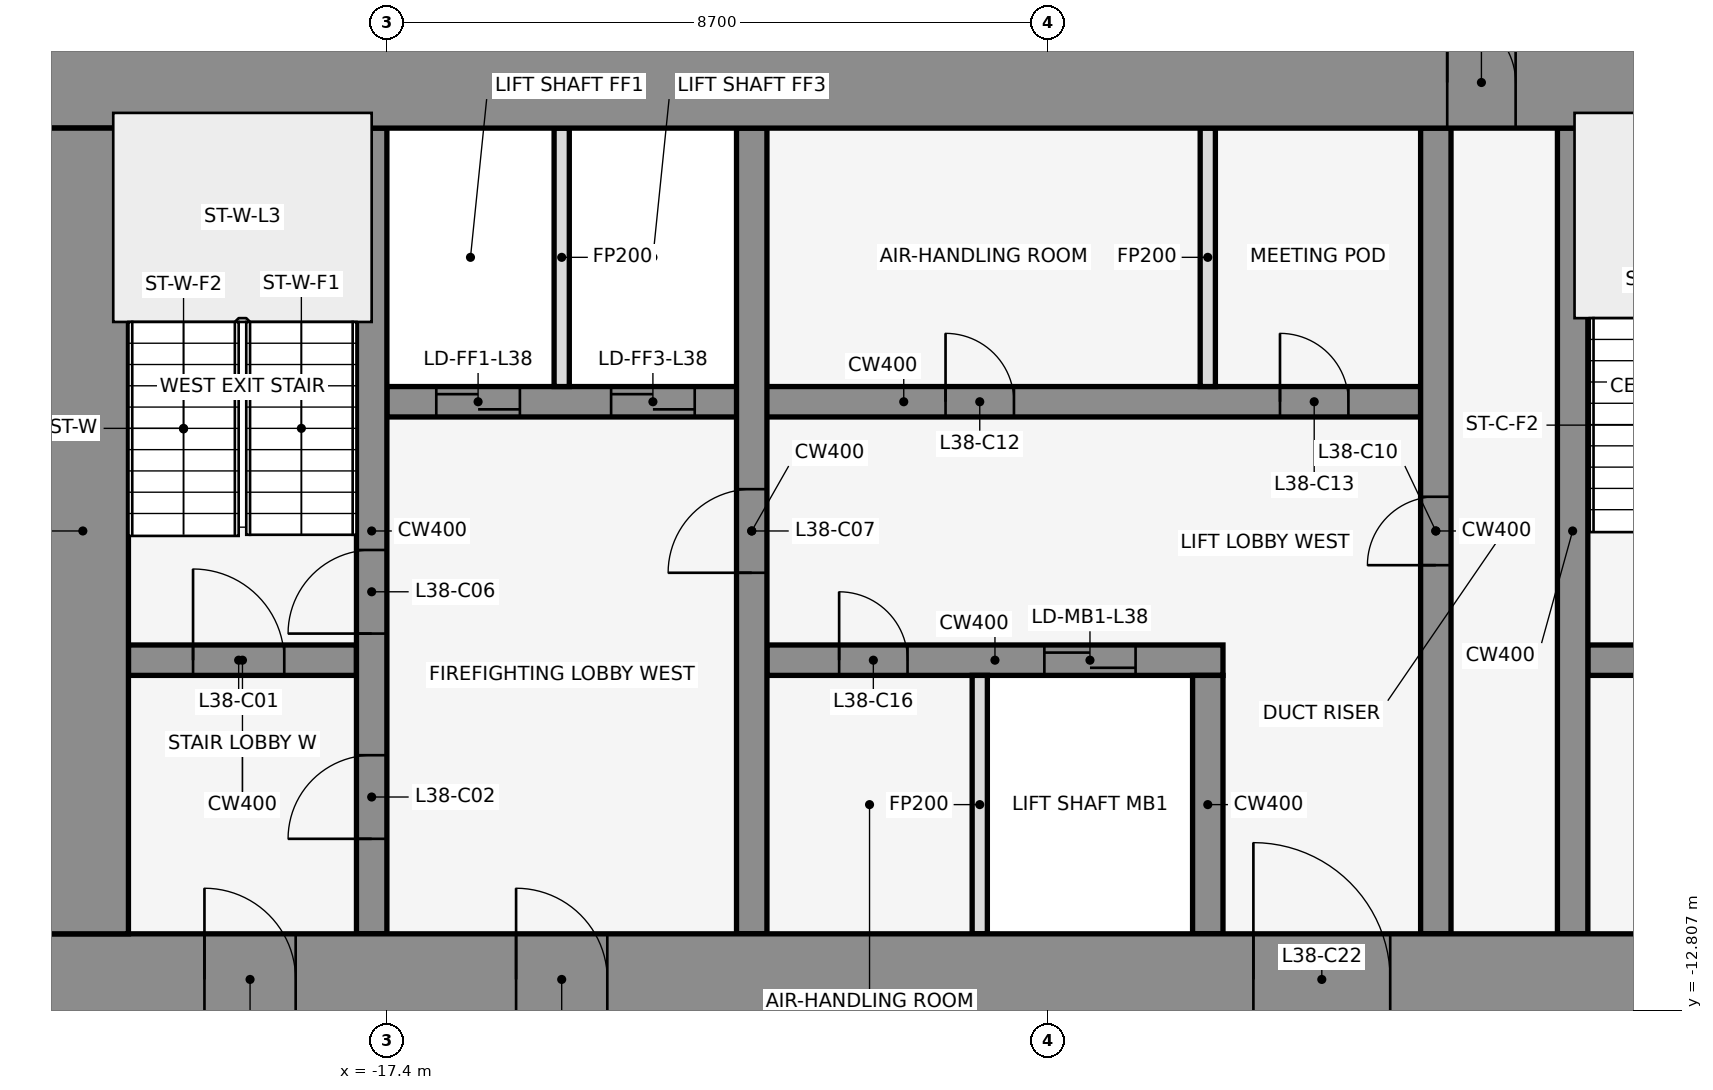
"""IFC4 building model, lengths in metres.
Left out: names, types, materials, properties, quantities, classifications, styles, units other than length and angle.
Written with IfcOpenShell. Run it as: python <this file> out.ifc"""

import sys

from ifc_helpers import new_model, si_unit, direction, frame, frame_2d, origin, place, context, subcontext, project, spatial, rectangle, extrude, element, fill, save


model = new_model("IFC4")
c1 = context("Model", 3, precision=1e-05, world=origin(), true_north=direction((0.0, 1.0)))
c2 = subcontext(c1, "Body", "Model", "MODEL_VIEW")
j1 = project(units=[si_unit("LENGTHUNIT", "METRE"), si_unit("PLANEANGLEUNIT", "RADIAN")], contexts=[c1])
p1 = place(None, origin())
s1 = spatial("IfcSite", under=j1, at=p1, CompositionType="ELEMENT")
p2 = place(p1, origin())
s2 = spatial("IfcBuilding", under=s1, at=p2, CompositionType="ELEMENT")
p3 = place(p2, frame((0.0, 0.0, 173.2)))
s3 = spatial("IfcBuildingStorey", under=s2, at=p3, CompositionType="ELEMENT", Elevation=173.2)
for number, where, z_axis, x_axis in (
    (1, (-0.068, -0.105, 0.0), (0.0, 0.0, 1.0), (-0.84, 0.543, 0.0)),
    (2, (-14.599, 1.08, 0.0), (0.0, 0.0, 1.0), (-0.84, -0.543, 0.0)),
):
    element("IfcWall", number, at=place(p3, frame(where, z_axis=z_axis, x_axis=x_axis)), inside=s3, PredefinedType="STANDARD", context=c2, shape_type="SweptSolid", body=[
        extrude(rectangle(XDim=2.183, YDim=0.25, at=frame_2d((1.091, 0.0))), origin(), (0.0, 0.0, 1.0), 3.95),
    ])
p4 = place(p3, frame((-20.8, -8.2, 0.0), z_axis=(0.0, 0.0, 1.0), x_axis=(1.0, 0.0, 0.0)))
e3 = element("IfcWall", 3, at=p4, inside=s3, PredefinedType="SHEAR", context=c2, shape_type="SweptSolid", body=[
    extrude(rectangle(XDim=3.0, YDim=0.4, at=frame_2d((1.5, 0.0))), origin(), (0.0, 0.0, 1.0), 4.1),
])
p5 = place(p4, frame((0.85, 0.0, 0.0)))
e4 = element("IfcOpeningElement", 4, at=p5, cuts=e3, PredefinedType="OPENING", context=c2, shape_type="SweptSolid", body=[
    extrude(rectangle(XDim=1.2, YDim=2.1, at=frame_2d((0.6, 1.05))), frame((0.0, 0.212, 0.0), z_axis=(0.0, -1.0, 0.0), x_axis=(1.0, 0.0, 0.0)), (0.0, 0.0, 1.0), 0.424),
])
p6 = place(p3, frame((-12.4, -8.2, 0.0), z_axis=(0.0, 0.0, 1.0), x_axis=(1.0, 0.0, 0.0)))
e5 = element("IfcWall", 5, at=p6, inside=s3, PredefinedType="SHEAR", context=c2, shape_type="SweptSolid", body=[
    extrude(rectangle(XDim=6.0, YDim=0.4, at=frame_2d((3.0, 0.0))), origin(), (0.0, 0.0, 1.0), 4.1),
])
p7 = place(p6, frame((3.65, 0.0, 0.0)))
e6 = element("IfcOpeningElement", 6, at=p7, cuts=e5, PredefinedType="OPENING", context=c2, shape_type="SweptSolid", body=[
    extrude(rectangle(XDim=1.2, YDim=2.1, at=frame_2d((0.6, 1.05))), frame((0.0, 0.212, 0.0), z_axis=(0.0, -1.0, 0.0), x_axis=(1.0, 0.0, 0.0)), (0.0, 0.0, 1.0), 0.424),
])
p8 = place(p6, frame((0.95, 0.0, 0.0)))
e7 = element("IfcOpeningElement", 7, at=p8, cuts=e5, PredefinedType="OPENING", context=c2, shape_type="SweptSolid", body=[
    extrude(rectangle(XDim=0.9, YDim=2.1, at=frame_2d((0.45, 1.05))), frame((0.0, 0.212, 0.0), z_axis=(0.0, -1.0, 0.0), x_axis=(1.0, 0.0, 0.0)), (0.0, 0.0, 1.0), 0.424),
])
p9 = place(p3, frame((-1.6, -8.2, 0.0), z_axis=(0.0, 0.0, 1.0), x_axis=(1.0, 0.0, 0.0)))
e8 = element("IfcWall", 8, at=p9, inside=s3, PredefinedType="SHEAR", context=c2, shape_type="SweptSolid", body=[
    extrude(rectangle(XDim=3.2, YDim=0.4, at=frame_2d((1.6, 0.0))), origin(), (0.0, 0.0, 1.0), 4.1),
])
p10 = place(p9, frame((1.05, 0.0, 0.0)))
e9 = element("IfcOpeningElement", 9, at=p10, cuts=e8, PredefinedType="OPENING", context=c2, shape_type="SweptSolid", body=[
    extrude(rectangle(XDim=1.2, YDim=2.1, at=frame_2d((0.6, 1.05))), frame((0.0, 0.212, 0.0), z_axis=(0.0, -1.0, 0.0), x_axis=(1.0, 0.0, 0.0)), (0.0, 0.0, 1.0), 0.424),
])
p11 = place(p3, frame((-17.4, -4.8, 0.0), z_axis=(0.0, 0.0, 1.0), x_axis=(1.0, 0.0, 0.0)))
e10 = element("IfcWall", 10, at=p11, inside=s3, PredefinedType="SHEAR", context=c2, shape_type="SweptSolid", body=[
    extrude(rectangle(XDim=13.6, YDim=0.4, at=frame_2d((6.8, 0.0))), origin(), (0.0, 0.0, 1.0), 4.1),
])
p12 = place(p11, frame((0.65, 0.0, 0.0)))
e11 = element("IfcOpeningElement", 11, at=p12, cuts=e10, PredefinedType="OPENING", context=c2, shape_type="SweptSolid", body=[
    extrude(rectangle(XDim=1.1, YDim=2.1, at=frame_2d((0.55, 1.05))), frame((0.0, 0.212, 0.0), z_axis=(0.0, -1.0, 0.0), x_axis=(1.0, 0.0, 0.0)), (0.0, 0.0, 1.0), 0.424),
])
p13 = place(p11, frame((2.95, 0.0, 0.0)))
e12 = element("IfcOpeningElement", 12, at=p13, cuts=e10, PredefinedType="OPENING", context=c2, shape_type="SweptSolid", body=[
    extrude(rectangle(XDim=1.1, YDim=2.1, at=frame_2d((0.55, 1.05))), frame((0.0, 0.212, 0.0), z_axis=(0.0, -1.0, 0.0), x_axis=(1.0, 0.0, 0.0)), (0.0, 0.0, 1.0), 0.424),
])
p14 = place(p11, frame((7.35, 0.0, 0.0)))
e13 = element("IfcOpeningElement", 13, at=p14, cuts=e10, PredefinedType="OPENING", context=c2, shape_type="SweptSolid", body=[
    extrude(rectangle(XDim=0.9, YDim=2.1, at=frame_2d((0.45, 1.05))), frame((0.0, 0.212, 0.0), z_axis=(0.0, -1.0, 0.0), x_axis=(1.0, 0.0, 0.0)), (0.0, 0.0, 1.0), 0.424),
])
p15 = place(p11, frame((11.75, 0.0, 0.0)))
e14 = element("IfcOpeningElement", 14, at=p15, cuts=e10, PredefinedType="OPENING", context=c2, shape_type="SweptSolid", body=[
    extrude(rectangle(XDim=0.9, YDim=2.1, at=frame_2d((0.45, 1.05))), frame((0.0, 0.212, 0.0), z_axis=(0.0, -1.0, 0.0), x_axis=(1.0, 0.0, 0.0)), (0.0, 0.0, 1.0), 0.424),
])
p16 = place(p3, frame((-17.6, -11.8, 0.0), z_axis=(0.0, 0.0, 1.0), x_axis=(0.0, 1.0, 0.0)))
e15 = element("IfcWall", 15, at=p16, inside=s3, PredefinedType="SHEAR", context=c2, shape_type="SweptSolid", body=[
    extrude(rectangle(XDim=10.6, YDim=0.4, at=frame_2d((5.3, 0.0))), origin(), (0.0, 0.0, 1.0), 4.1),
])
p17 = place(p16, frame((1.25, 0.0, 0.0)))
e16 = element("IfcOpeningElement", 16, at=p17, cuts=e15, PredefinedType="OPENING", context=c2, shape_type="SweptSolid", body=[
    extrude(rectangle(XDim=1.1, YDim=2.1, at=frame_2d((0.55, 1.05))), frame((0.0, 0.212, 0.0), z_axis=(0.0, -1.0, 0.0), x_axis=(1.0, 0.0, 0.0)), (0.0, 0.0, 1.0), 0.424),
])
p18 = place(p16, frame((3.95, 0.0, 0.0)))
e17 = element("IfcOpeningElement", 17, at=p18, cuts=e15, PredefinedType="OPENING", context=c2, shape_type="SweptSolid", body=[
    extrude(rectangle(XDim=1.1, YDim=2.1, at=frame_2d((0.55, 1.05))), frame((0.0, 0.212, 0.0), z_axis=(0.0, -1.0, 0.0), x_axis=(1.0, 0.0, 0.0)), (0.0, 0.0, 1.0), 0.424),
])
p19 = place(p3, frame((-15.1, -4.6, 0.0), z_axis=(0.0, 0.0, 1.0), x_axis=(0.0, 1.0, 0.0)))
e18 = element("IfcWall", 18, at=p19, inside=s3, PredefinedType="PARTITIONING", context=c2, shape_type="SweptSolid", body=[
    extrude(rectangle(XDim=3.4, YDim=0.2, at=frame_2d((1.7, 0.0))), origin(), (0.0, 0.0, 1.0), 2.84),
])
p20 = place(p3, frame((-12.6, -11.8, 0.0), z_axis=(0.0, 0.0, 1.0), x_axis=(0.0, 1.0, 0.0)))
e19 = element("IfcWall", 19, at=p20, inside=s3, PredefinedType="SHEAR", context=c2, shape_type="SweptSolid", body=[
    extrude(rectangle(XDim=10.6, YDim=0.4, at=frame_2d((5.3, 0.0))), origin(), (0.0, 0.0, 1.0), 4.1),
])
p21 = place(p20, frame((4.75, 0.0, 0.0)))
e20 = element("IfcOpeningElement", 20, at=p21, cuts=e19, PredefinedType="OPENING", context=c2, shape_type="SweptSolid", body=[
    extrude(rectangle(XDim=1.1, YDim=2.1, at=frame_2d((0.55, 1.05))), frame((0.0, 0.212, 0.0), z_axis=(0.0, -1.0, 0.0), x_axis=(1.0, 0.0, 0.0)), (0.0, 0.0, 1.0), 0.424),
])
p22 = place(p3, frame((-9.6, -11.8, 0.0), z_axis=(0.0, 0.0, 1.0), x_axis=(0.0, 1.0, 0.0)))
e21 = element("IfcWall", 21, at=p22, inside=s3, PredefinedType="PARTITIONING", context=c2, shape_type="SweptSolid", body=[
    extrude(rectangle(XDim=3.4, YDim=0.2, at=frame_2d((1.7, 0.0))), origin(), (0.0, 0.0, 1.0), 2.84),
])
p23 = place(p3, frame((-6.6, -11.8, 0.0), z_axis=(0.0, 0.0, 1.0), x_axis=(0.0, 1.0, 0.0)))
e22 = element("IfcWall", 22, at=p23, inside=s3, PredefinedType="SHEAR", context=c2, shape_type="SweptSolid", body=[
    extrude(rectangle(XDim=3.4, YDim=0.4, at=frame_2d((1.7, 0.0))), origin(), (0.0, 0.0, 1.0), 4.1),
])
p24 = place(p3, frame((-6.6, -4.6, 0.0), z_axis=(0.0, 0.0, 1.0), x_axis=(0.0, 1.0, 0.0)))
e23 = element("IfcWall", 23, at=p24, inside=s3, PredefinedType="PARTITIONING", context=c2, shape_type="SweptSolid", body=[
    extrude(rectangle(XDim=3.4, YDim=0.2, at=frame_2d((1.7, 0.0))), origin(), (0.0, 0.0, 1.0), 2.84),
])
p25 = place(p3, frame((-3.6, -11.8, 0.0), z_axis=(0.0, 0.0, 1.0), x_axis=(0.0, 1.0, 0.0)))
e24 = element("IfcWall", 24, at=p25, inside=s3, PredefinedType="SHEAR", context=c2, shape_type="SweptSolid", body=[
    extrude(rectangle(XDim=10.6, YDim=0.4, at=frame_2d((5.3, 0.0))), origin(), (0.0, 0.0, 1.0), 4.1),
])
p26 = place(p25, frame((4.85, 0.0, 0.0)))
e25 = element("IfcOpeningElement", 25, at=p26, cuts=e24, PredefinedType="OPENING", context=c2, shape_type="SweptSolid", body=[
    extrude(rectangle(XDim=0.9, YDim=2.1, at=frame_2d((0.45, 1.05))), frame((0.0, 0.212, 0.0), z_axis=(0.0, -1.0, 0.0), x_axis=(1.0, 0.0, 0.0)), (0.0, 0.0, 1.0), 0.424),
])
p27 = place(p3, frame((-1.8, -11.8, 0.0), z_axis=(0.0, 0.0, 1.0), x_axis=(0.0, 1.0, 0.0)))
e26 = element("IfcWall", 26, at=p27, inside=s3, PredefinedType="SHEAR", context=c2, shape_type="SweptSolid", body=[
    extrude(rectangle(XDim=10.6, YDim=0.4, at=frame_2d((5.3, 0.0))), origin(), (0.0, 0.0, 1.0), 4.1),
])
p28 = place(p3, frame((-22.0, -0.6, 0.0), z_axis=(0.0, 0.0, 1.0), x_axis=(1.0, 0.0, 0.0)))
e27 = element("IfcWall", 27, at=p28, inside=s3, PredefinedType="SHEAR", context=c2, shape_type="SweptSolid", body=[
    extrude(rectangle(XDim=44.0, YDim=1.2, at=frame_2d((22.0, 0.0))), origin(), (0.0, 0.0, 1.0), 4.1),
])
p29 = place(p28, frame((18.55, 0.0, 0.0)))
e28 = element("IfcOpeningElement", 28, at=p29, cuts=e27, PredefinedType="OPENING", context=c2, shape_type="SweptSolid", body=[
    extrude(rectangle(XDim=0.9, YDim=2.1, at=frame_2d((0.45, 1.05))), frame((0.0, 0.612, 0.0), z_axis=(0.0, -1.0, 0.0), x_axis=(1.0, 0.0, 0.0)), (0.0, 0.0, 1.0), 1.224),
])
p30 = place(p28, frame((24.55, 0.0, 0.0)))
e29 = element("IfcOpeningElement", 29, at=p30, cuts=e27, PredefinedType="OPENING", context=c2, shape_type="SweptSolid", body=[
    extrude(rectangle(XDim=0.9, YDim=2.1, at=frame_2d((0.45, 1.05))), frame((0.0, 0.612, 0.0), z_axis=(0.0, -1.0, 0.0), x_axis=(1.0, 0.0, 0.0)), (0.0, 0.0, 1.0), 1.224),
])
p31 = place(p3, frame((-22.0, -12.4, 0.0), z_axis=(0.0, 0.0, 1.0), x_axis=(1.0, 0.0, 0.0)))
e30 = element("IfcWall", 30, at=p31, inside=s3, PredefinedType="SHEAR", context=c2, shape_type="SweptSolid", body=[
    extrude(rectangle(XDim=44.0, YDim=1.2, at=frame_2d((22.0, 0.0))), origin(), (0.0, 0.0, 1.0), 4.1),
])
p32 = place(p31, frame((2.2, 0.0, 0.0)))
e31 = element("IfcOpeningElement", 31, at=p32, cuts=e30, PredefinedType="OPENING", context=c2, shape_type="SweptSolid", body=[
    extrude(rectangle(XDim=1.2, YDim=2.1, at=frame_2d((0.6, 1.05))), frame((0.0, 0.612, 0.0), z_axis=(0.0, -1.0, 0.0), x_axis=(1.0, 0.0, 0.0)), (0.0, 0.0, 1.0), 1.224),
])
p33 = place(p31, frame((21.4, 0.0, 0.0)))
e32 = element("IfcOpeningElement", 32, at=p33, cuts=e30, PredefinedType="OPENING", context=c2, shape_type="SweptSolid", body=[
    extrude(rectangle(XDim=1.2, YDim=2.1, at=frame_2d((0.6, 1.05))), frame((0.0, 0.612, 0.0), z_axis=(0.0, -1.0, 0.0), x_axis=(1.0, 0.0, 0.0)), (0.0, 0.0, 1.0), 1.224),
])
p34 = place(p31, frame((40.6, 0.0, 0.0)))
e33 = element("IfcOpeningElement", 33, at=p34, cuts=e30, PredefinedType="OPENING", context=c2, shape_type="SweptSolid", body=[
    extrude(rectangle(XDim=1.2, YDim=2.1, at=frame_2d((0.6, 1.05))), frame((0.0, 0.612, 0.0), z_axis=(0.0, -1.0, 0.0), x_axis=(1.0, 0.0, 0.0)), (0.0, 0.0, 1.0), 1.224),
])
p35 = place(p31, frame((16.0, 0.0, 0.0)))
e34 = element("IfcOpeningElement", 34, at=p35, cuts=e30, PredefinedType="OPENING", context=c2, shape_type="SweptSolid", body=[
    extrude(rectangle(XDim=1.8, YDim=2.1, at=frame_2d((0.9, 1.05))), frame((0.0, 0.612, 0.0), z_axis=(0.0, -1.0, 0.0), x_axis=(1.0, 0.0, 0.0)), (0.0, 0.0, 1.0), 1.224),
])
p36 = place(p31, frame((6.3, 0.0, 0.0)))
e35 = element("IfcOpeningElement", 35, at=p36, cuts=e30, PredefinedType="OPENING", context=c2, shape_type="SweptSolid", body=[
    extrude(rectangle(XDim=1.2, YDim=2.1, at=frame_2d((0.6, 1.05))), frame((0.0, 0.612, 0.0), z_axis=(0.0, -1.0, 0.0), x_axis=(1.0, 0.0, 0.0)), (0.0, 0.0, 1.0), 1.224),
])
p37 = place(p31, frame((26.2, 0.0, 0.0)))
e36 = element("IfcOpeningElement", 36, at=p37, cuts=e30, PredefinedType="OPENING", context=c2, shape_type="SweptSolid", body=[
    extrude(rectangle(XDim=1.8, YDim=2.1, at=frame_2d((0.9, 1.05))), frame((0.0, 0.612, 0.0), z_axis=(0.0, -1.0, 0.0), x_axis=(1.0, 0.0, 0.0)), (0.0, 0.0, 1.0), 1.224),
])
p38 = place(p31, frame((36.5, 0.0, 0.0)))
e37 = element("IfcOpeningElement", 37, at=p38, cuts=e30, PredefinedType="OPENING", context=c2, shape_type="SweptSolid", body=[
    extrude(rectangle(XDim=1.2, YDim=2.1, at=frame_2d((0.6, 1.05))), frame((0.0, 0.612, 0.0), z_axis=(0.0, -1.0, 0.0), x_axis=(1.0, 0.0, 0.0)), (0.0, 0.0, 1.0), 1.224),
])
p39 = place(p3, frame((-21.4, -11.8, 0.0), z_axis=(0.0, 0.0, 1.0), x_axis=(0.0, 1.0, 0.0)))
e38 = element("IfcWall", 38, at=p39, inside=s3, PredefinedType="SHEAR", context=c2, shape_type="SweptSolid", body=[
    extrude(rectangle(XDim=10.6, YDim=1.2, at=frame_2d((5.3, 0.0))), origin(), (0.0, 0.0, 1.0), 4.1),
])
p40 = place(p5, origin())
e39 = element("IfcDoor", 39, at=p40, inside=s3, OperationType="SINGLE_SWING_LEFT", PredefinedType="DOOR", context=c2, shape_type="SweptSolid", body=[
    extrude(rectangle(XDim=1.2, YDim=2.1, at=frame_2d((0.6, 1.05))), frame((0.0, 0.025, 0.0), z_axis=(0.0, -1.0, 0.0), x_axis=(1.0, 0.0, 0.0)), (0.0, 0.0, 1.0), 0.05),
])
fill(e4, e39)
p41 = place(p17, frame((1.1, 0.0, 0.0), z_axis=(0.0, 0.0, 1.0), x_axis=(-1.0, 0.0, 0.0)))
e40 = element("IfcDoor", 40, at=p41, inside=s3, OperationType="SINGLE_SWING_LEFT", PredefinedType="DOOR", context=c2, shape_type="SweptSolid", body=[
    extrude(rectangle(XDim=1.1, YDim=2.1, at=frame_2d((0.55, 1.05))), frame((0.0, 0.025, 0.0), z_axis=(0.0, -1.0, 0.0), x_axis=(1.0, 0.0, 0.0)), (0.0, 0.0, 1.0), 0.05),
])
fill(e16, e40)
p42 = place(p12, origin())
e41 = element("IfcDoor", 41, at=p42, inside=s3, OperationType="DOUBLE_DOOR_SLIDING", PredefinedType="DOOR", context=c2, shape_type="SweptSolid", body=[
    extrude(rectangle(XDim=1.1, YDim=2.1, at=frame_2d((0.55, 1.05))), frame((0.0, 0.025, 0.0), z_axis=(0.0, -1.0, 0.0), x_axis=(1.0, 0.0, 0.0)), (0.0, 0.0, 1.0), 0.05),
])
fill(e11, e41)
p43 = place(p13, origin())
e42 = element("IfcDoor", 42, at=p43, inside=s3, OperationType="DOUBLE_DOOR_SLIDING", PredefinedType="DOOR", context=c2, shape_type="SweptSolid", body=[
    extrude(rectangle(XDim=1.1, YDim=2.1, at=frame_2d((0.55, 1.05))), frame((0.0, 0.025, 0.0), z_axis=(0.0, -1.0, 0.0), x_axis=(1.0, 0.0, 0.0)), (0.0, 0.0, 1.0), 0.05),
])
fill(e12, e42)
p44 = place(p7, origin())
e43 = element("IfcDoor", 43, at=p44, inside=s3, OperationType="DOUBLE_DOOR_SLIDING", PredefinedType="DOOR", context=c2, shape_type="SweptSolid", body=[
    extrude(rectangle(XDim=1.2, YDim=2.1, at=frame_2d((0.6, 1.05))), frame((0.0, 0.025, 0.0), z_axis=(0.0, -1.0, 0.0), x_axis=(1.0, 0.0, 0.0)), (0.0, 0.0, 1.0), 0.05),
])
fill(e6, e43)
p45 = place(p18, frame((1.1, 0.0, 0.0), z_axis=(0.0, 0.0, 1.0), x_axis=(-1.0, 0.0, 0.0)))
e44 = element("IfcDoor", 44, at=p45, inside=s3, OperationType="SINGLE_SWING_LEFT", PredefinedType="DOOR", context=c2, shape_type="SweptSolid", body=[
    extrude(rectangle(XDim=1.1, YDim=2.1, at=frame_2d((0.55, 1.05))), frame((0.0, 0.025, 0.0), z_axis=(0.0, -1.0, 0.0), x_axis=(1.0, 0.0, 0.0)), (0.0, 0.0, 1.0), 0.05),
])
fill(e17, e44)
p46 = place(p21, origin())
e45 = element("IfcDoor", 45, at=p46, inside=s3, OperationType="SINGLE_SWING_LEFT", PredefinedType="DOOR", context=c2, shape_type="SweptSolid", body=[
    extrude(rectangle(XDim=1.1, YDim=2.1, at=frame_2d((0.55, 1.05))), frame((0.0, 0.025, 0.0), z_axis=(0.0, -1.0, 0.0), x_axis=(1.0, 0.0, 0.0)), (0.0, 0.0, 1.0), 0.05),
])
fill(e20, e45)
p47 = place(p26, frame((0.9, 0.0, 0.0), z_axis=(0.0, 0.0, 1.0), x_axis=(-1.0, 0.0, 0.0)))
e46 = element("IfcDoor", 46, at=p47, inside=s3, OperationType="SINGLE_SWING_LEFT", PredefinedType="DOOR", context=c2, shape_type="SweptSolid", body=[
    extrude(rectangle(XDim=0.9, YDim=2.1, at=frame_2d((0.45, 1.05))), frame((0.0, 0.025, 0.0), z_axis=(0.0, -1.0, 0.0), x_axis=(1.0, 0.0, 0.0)), (0.0, 0.0, 1.0), 0.05),
])
fill(e25, e46)
p48 = place(p14, origin())
e47 = element("IfcDoor", 47, at=p48, inside=s3, OperationType="SINGLE_SWING_RIGHT", PredefinedType="DOOR", context=c2, shape_type="SweptSolid", body=[
    extrude(rectangle(XDim=0.9, YDim=2.1, at=frame_2d((0.45, 1.05))), frame((0.0, 0.025, 0.0), z_axis=(0.0, -1.0, 0.0), x_axis=(1.0, 0.0, 0.0)), (0.0, 0.0, 1.0), 0.05),
])
fill(e13, e47)
p49 = place(p15, origin())
e48 = element("IfcDoor", 48, at=p49, inside=s3, OperationType="SINGLE_SWING_LEFT", PredefinedType="DOOR", context=c2, shape_type="SweptSolid", body=[
    extrude(rectangle(XDim=0.9, YDim=2.1, at=frame_2d((0.45, 1.05))), frame((0.0, 0.025, 0.0), z_axis=(0.0, -1.0, 0.0), x_axis=(1.0, 0.0, 0.0)), (0.0, 0.0, 1.0), 0.05),
])
fill(e14, e48)
p50 = place(p8, frame((0.9, 0.0, 0.0), z_axis=(0.0, 0.0, 1.0), x_axis=(-1.0, 0.0, 0.0)))
e49 = element("IfcDoor", 49, at=p50, inside=s3, OperationType="SINGLE_SWING_LEFT", PredefinedType="DOOR", context=c2, shape_type="SweptSolid", body=[
    extrude(rectangle(XDim=0.9, YDim=2.1, at=frame_2d((0.45, 1.05))), frame((0.0, 0.025, 0.0), z_axis=(0.0, -1.0, 0.0), x_axis=(1.0, 0.0, 0.0)), (0.0, 0.0, 1.0), 0.05),
])
fill(e7, e49)
p51 = place(p29, origin())
e50 = element("IfcDoor", 50, at=p51, inside=s3, OperationType="SINGLE_SWING_LEFT", PredefinedType="DOOR", context=c2, shape_type="SweptSolid", body=[
    extrude(rectangle(XDim=0.9, YDim=2.1, at=frame_2d((0.45, 1.05))), frame((0.0, 0.025, 0.0), z_axis=(0.0, -1.0, 0.0), x_axis=(1.0, 0.0, 0.0)), (0.0, 0.0, 1.0), 0.05),
])
fill(e28, e50)
p52 = place(p32, frame((1.2, 0.0, 0.0), z_axis=(0.0, 0.0, 1.0), x_axis=(-1.0, 0.0, 0.0)))
e51 = element("IfcDoor", 51, at=p52, inside=s3, OperationType="SINGLE_SWING_RIGHT", PredefinedType="DOOR", context=c2, shape_type="SweptSolid", body=[
    extrude(rectangle(XDim=1.2, YDim=2.1, at=frame_2d((0.6, 1.05))), frame((0.0, 0.025, 0.0), z_axis=(0.0, -1.0, 0.0), x_axis=(1.0, 0.0, 0.0)), (0.0, 0.0, 1.0), 0.05),
])
fill(e31, e51)
p53 = place(p35, origin())
e52 = element("IfcDoor", 52, at=p53, inside=s3, OperationType="SINGLE_SWING_LEFT", PredefinedType="DOOR", context=c2, shape_type="SweptSolid", body=[
    extrude(rectangle(XDim=1.8, YDim=2.1, at=frame_2d((0.9, 1.05))), frame((0.0, 0.025, 0.0), z_axis=(0.0, -1.0, 0.0), x_axis=(1.0, 0.0, 0.0)), (0.0, 0.0, 1.0), 0.05),
])
fill(e34, e52)
p54 = place(p36, frame((1.2, 0.0, 0.0), z_axis=(0.0, 0.0, 1.0), x_axis=(-1.0, 0.0, 0.0)))
e53 = element("IfcDoor", 53, at=p54, inside=s3, OperationType="SINGLE_SWING_RIGHT", PredefinedType="DOOR", context=c2, shape_type="SweptSolid", body=[
    extrude(rectangle(XDim=1.2, YDim=2.1, at=frame_2d((0.6, 1.05))), frame((0.0, 0.025, 0.0), z_axis=(0.0, -1.0, 0.0), x_axis=(1.0, 0.0, 0.0)), (0.0, 0.0, 1.0), 0.05),
])
fill(e35, e53)
save(model, sys.argv[1])
